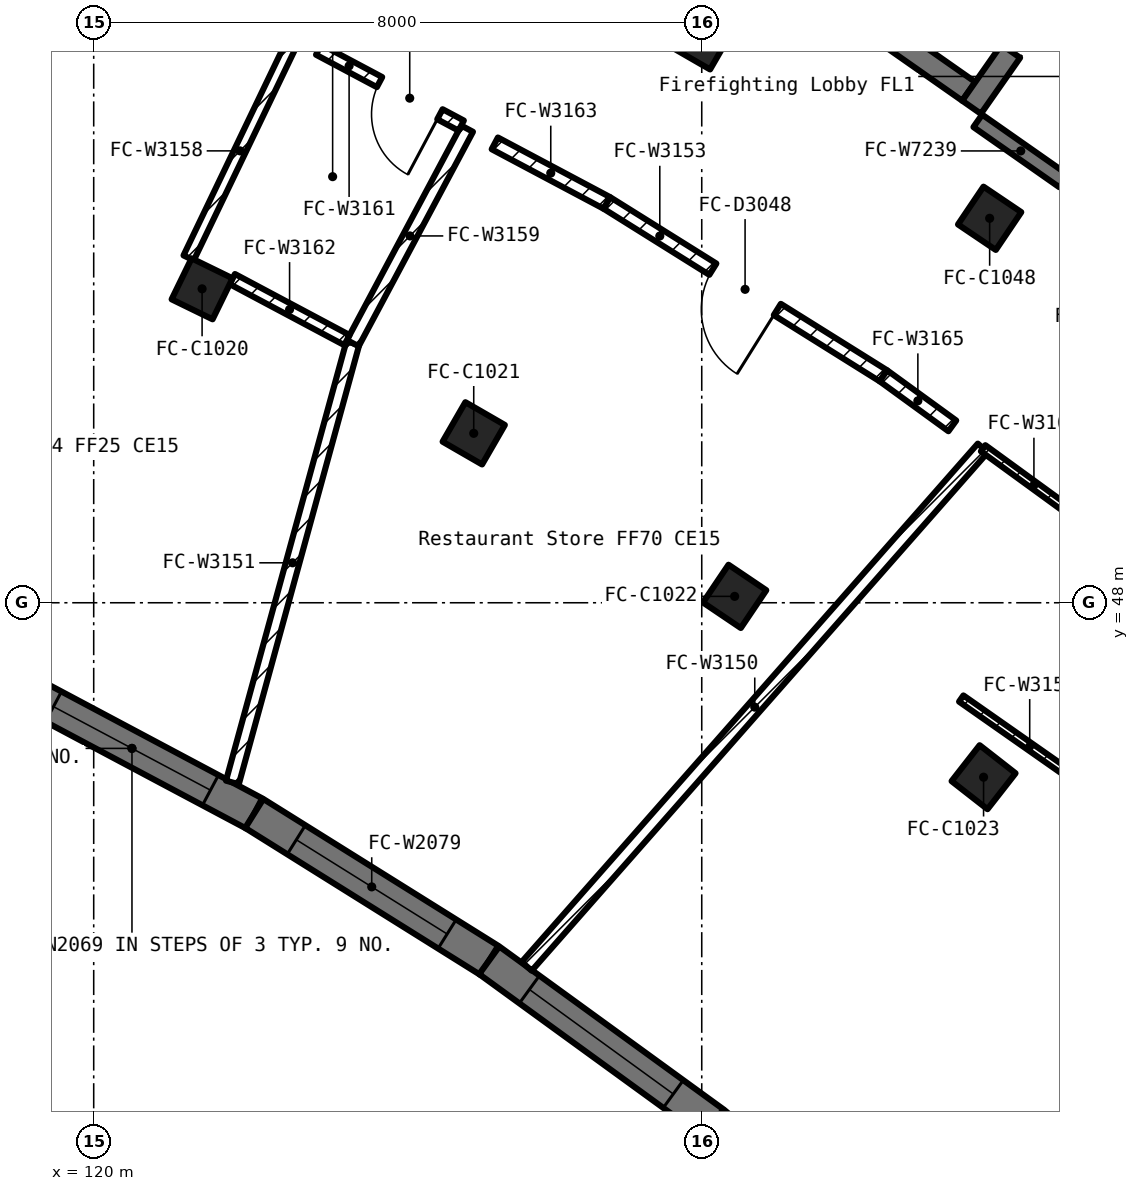
"""IFC4 building model, lengths in metres.
Left out: names, types, materials, properties, quantities, classifications, styles, units other than length and angle.
Written with IfcOpenShell. Run it as: python <this file> out.ifc"""

import sys

from ifc_helpers import new_model, si_unit, direction, frame, frame_2d, origin, origin_2d, place, context, subcontext, project, spatial, rectangle, extrude, element, fill, save


model = new_model("IFC4")
c1 = context("Model", 3, precision=1e-05, world=origin(), true_north=direction((0.0, 1.0)))
c2 = subcontext(c1, "Body", "Model", "MODEL_VIEW")
j1 = project(units=[si_unit("LENGTHUNIT", "METRE"), si_unit("PLANEANGLEUNIT", "RADIAN")], contexts=[c1])
p1 = place(None, origin())
s1 = spatial("IfcSite", under=j1, at=p1, CompositionType="ELEMENT")
p2 = place(p1, origin())
s2 = spatial("IfcBuilding", under=s1, at=p2, CompositionType="ELEMENT")
p3 = place(p2, frame((0.0, 0.0, 22.5)))
s3 = spatial("IfcBuildingStorey", under=s2, at=p3, CompositionType="ELEMENT", Elevation=22.5)
for number, where, z_axis, x_axis in (
    (1, (121.426, 52.13, 0.0), (0.0, 0.0, 1.0), (0.899, -0.438, 0.0)),
    (2, (125.0, 50.229, 0.0), (0.0, 0.0, 1.0), (0.866, -0.5, 0.0)),
    (3, (128.433, 48.084, 0.0), (0.0, 0.0, 1.0), (0.829, -0.559, 0.0)),
    (4, (131.708, 45.705, 0.0), (0.0, 0.0, 1.0), (0.788, -0.616, 0.0)),
    (5, (128.0, 55.426, 0.0), (0.0, 0.0, 1.0), (0.866, -0.5, 0.0)),
    (6, (131.788, 53.058, 0.0), (0.0, 0.0, 1.0), (0.829, -0.559, 0.0)),
):
    element("IfcColumn", number, at=place(p3, frame(where, z_axis=z_axis, x_axis=x_axis)), inside=s3, PredefinedType="COLUMN", context=c2, shape_type="SweptSolid", body=[
        extrude(rectangle(XDim=0.6, YDim=0.6, at=origin_2d()), origin(), (0.0, 0.0, 1.0), 5.5),
    ])
p4 = place(p3, frame((118.894, 46.94, 0.0), z_axis=(0.0, 0.0, 1.0), x_axis=(0.882849344925, -0.469656293651, 0.0)))
e7 = element("IfcWall", 7, at=p4, inside=s3, PredefinedType="SOLIDWALL", context=c2, shape_type="SweptSolid", body=[
    extrude(rectangle(XDim=3.645, YDim=0.45, at=frame_2d((1.823, 0.0))), origin(), (0.0, 0.0, 1.0), 5.5),
])
p5 = place(p4, frame((0.653, 0.0, 1.4)))
e8 = element("IfcOpeningElement", 8, at=p5, cuts=e7, PredefinedType="OPENING", context=c2, shape_type="SweptSolid", body=[
    extrude(rectangle(XDim=2.34, YDim=2.4, at=frame_2d((1.17, 1.2))), frame((0.0, 0.237, 0.0), z_axis=(0.0, -1.0, 0.0), x_axis=(1.0, 0.0, 0.0)), (0.0, 0.0, 1.0), 0.474),
])
p6 = place(p3, frame((122.112, 45.228, 0.0), z_axis=(0.0, 0.0, 1.0), x_axis=(0.848047203697, -0.529920692464, 0.0)))
e9 = element("IfcWall", 9, at=p6, inside=s3, PredefinedType="SOLIDWALL", context=c2, shape_type="SweptSolid", body=[
    extrude(rectangle(XDim=3.646, YDim=0.45, at=frame_2d((1.823, 0.0))), origin(), (0.0, 0.0, 1.0), 5.5),
])
p7 = place(p6, frame((0.653, 0.0, 1.4)))
e10 = element("IfcOpeningElement", 10, at=p7, cuts=e9, PredefinedType="OPENING", context=c2, shape_type="SweptSolid", body=[
    extrude(rectangle(XDim=2.34, YDim=2.4, at=frame_2d((1.17, 1.2))), frame((0.0, 0.237, 0.0), z_axis=(0.0, -1.0, 0.0), x_axis=(1.0, 0.0, 0.0)), (0.0, 0.0, 1.0), 0.474),
])
p8 = place(p3, frame((125.204, 43.296, 0.0), z_axis=(0.0, 0.0, 1.0), x_axis=(0.809109587744, -0.58765778734, 0.0)))
e11 = element("IfcWall", 11, at=p8, inside=s3, PredefinedType="SOLIDWALL", context=c2, shape_type="SweptSolid", body=[
    extrude(rectangle(XDim=3.645, YDim=0.45, at=frame_2d((1.822, 0.0))), origin(), (0.0, 0.0, 1.0), 5.5),
])
p9 = place(p8, frame((0.653, 0.0, 1.4)))
e12 = element("IfcOpeningElement", 12, at=p9, cuts=e11, PredefinedType="OPENING", context=c2, shape_type="SweptSolid", body=[
    extrude(rectangle(XDim=2.34, YDim=2.4, at=frame_2d((1.17, 1.2))), frame((0.0, 0.237, 0.0), z_axis=(0.0, -1.0, 0.0), x_axis=(1.0, 0.0, 0.0)), (0.0, 0.0, 1.0), 0.474),
])
p10 = place(p3, frame((128.153, 41.154, 0.0), z_axis=(0.0, 0.0, 1.0), x_axis=(0.766009592259, -0.642829141038, 0.0)))
e13 = element("IfcWall", 13, at=p10, inside=s3, PredefinedType="SOLIDWALL", context=c2, shape_type="SweptSolid", body=[
    extrude(rectangle(XDim=3.645, YDim=0.45, at=frame_2d((1.822, 0.0))), origin(), (0.0, 0.0, 1.0), 5.5),
])
p11 = place(p10, frame((0.653, 0.0, 1.4)))
e14 = element("IfcOpeningElement", 14, at=p11, cuts=e13, PredefinedType="OPENING", context=c2, shape_type="SweptSolid", body=[
    extrude(rectangle(XDim=2.34, YDim=2.4, at=frame_2d((1.17, 1.2))), frame((0.0, 0.237, 0.0), z_axis=(0.0, -1.0, 0.0), x_axis=(1.0, 0.0, 0.0)), (0.0, 0.0, 1.0), 0.474),
])
p12 = place(p3, frame((127.418, 57.596, 0.0), z_axis=(0.0, 0.0, 1.0), x_axis=(0.819096538389, -0.573655698829, 0.0)))
e15 = element("IfcWall", 15, at=p12, inside=s3, PredefinedType="SOLIDWALL", context=c2, shape_type="SweptSolid", body=[
    extrude(rectangle(XDim=4.999, YDim=0.3, at=frame_2d((2.5, 0.0))), origin(), (0.0, 0.0, 1.0), 5.25),
])
p13 = place(p3, frame((131.55, 54.519, 0.0), z_axis=(0.0, 0.0, 1.0), x_axis=(0.573563925118, 0.819160804606, 0.0)))
e16 = element("IfcWall", 16, at=p13, inside=s3, PredefinedType="SOLIDWALL", context=c2, shape_type="SweptSolid", body=[
    extrude(rectangle(XDim=10.0, YDim=0.3, at=frame_2d((5.0, 0.0))), origin(), (0.0, 0.0, 1.0), 5.25),
])
p14 = place(p13, frame((0.9, 0.0, 0.0)))
e17 = element("IfcOpeningElement", 17, at=p14, cuts=e16, PredefinedType="OPENING", context=c2, shape_type="SweptSolid", body=[
    extrude(rectangle(XDim=1.2, YDim=2.1, at=frame_2d((0.6, 1.05))), frame((0.0, 0.162, 0.0), z_axis=(0.0, -1.0, 0.0), x_axis=(1.0, 0.0, 0.0)), (0.0, 0.0, 1.0), 0.324),
])
p15 = place(p3, frame((131.632, 54.34, 0.0), z_axis=(0.0, 0.0, 1.0), x_axis=(0.81911891796, -0.573623742744, 0.0)))
e18 = element("IfcWall", 18, at=p15, inside=s3, PredefinedType="PARTITIONING", context=c2, shape_type="SweptSolid", body=[
    extrude(rectangle(XDim=3.959, YDim=0.2, at=frame_2d((1.979, 0.0))), origin(), (0.0, 0.0, 1.0), 5.25),
])
p16 = place(p15, frame((1.38, 0.0, 0.0)))
e19 = element("IfcOpeningElement", 19, at=p16, cuts=e18, PredefinedType="OPENING", context=c2, shape_type="SweptSolid", body=[
    extrude(rectangle(XDim=1.2, YDim=2.1, at=frame_2d((0.6, 1.05))), frame((0.0, 0.112, 0.0), z_axis=(0.0, -1.0, 0.0), x_axis=(1.0, 0.0, 0.0)), (0.0, 0.0, 1.0), 0.224),
])
p17 = place(p3, frame((125.697, 43.217, 0.0), z_axis=(0.0, 0.0, 1.0), x_axis=(0.660652130462, 0.750692188927, 0.0)))
e20 = element("IfcWall", 20, at=p17, inside=s3, PredefinedType="PARTITIONING", context=c2, shape_type="SweptSolid", body=[
    extrude(rectangle(XDim=9.083, YDim=0.175, at=frame_2d((4.542, 0.0))), origin(), (0.0, 0.0, 1.0), 4.35),
])
p18 = place(p3, frame((123.409, 51.415, 0.0), z_axis=(0.0, 0.0, 1.0), x_axis=(-0.264341053294, -0.964429265184, 0.0)))
e21 = element("IfcWall", 21, at=p18, inside=s3, PredefinedType="PARTITIONING", context=c2, shape_type="SweptSolid", body=[
    extrude(rectangle(XDim=5.992, YDim=0.175, at=frame_2d((2.996, 0.0))), origin(), (0.0, 0.0, 1.0), 4.35),
])
p19 = place(p3, frame((131.414, 46.74, 0.0), z_axis=(0.0, 0.0, 1.0), x_axis=(0.81912644488, -0.573612994359, 0.0)))
e22 = element("IfcWall", 22, at=p19, inside=s3, PredefinedType="PARTITIONING", context=c2, shape_type="SweptSolid", body=[
    extrude(rectangle(XDim=6.199, YDim=0.1, at=frame_2d((3.1, 0.0))), origin(), (0.0, 0.0, 1.0), 4.35),
])
p20 = place(p19, frame((2.2, 0.0, 0.0)))
e23 = element("IfcOpeningElement", 23, at=p20, cuts=e22, PredefinedType="OPENING", context=c2, shape_type="SweptSolid", body=[
    extrude(rectangle(XDim=1.8, YDim=2.1, at=frame_2d((0.9, 1.05))), frame((0.0, 0.062, 0.0), z_axis=(0.0, -1.0, 0.0), x_axis=(1.0, 0.0, 0.0)), (0.0, 0.0, 1.0), 0.124),
])
p21 = place(p3, frame((130.39, 50.986, 0.0), z_axis=(0.0, 0.0, 1.0), x_axis=(-0.848001499411, 0.52999382732, 0.0)))
e24 = element("IfcWall", 24, at=p21, inside=s3, PredefinedType="PARTITIONING", context=c2, shape_type="SweptSolid", body=[
    extrude(rectangle(XDim=4.292, YDim=0.175, at=frame_2d((2.146, 0.0))), origin(), (0.0, 0.0, 1.0), 4.35),
])
p22 = place(p21, frame((1.646, 0.0, 0.0)))
e25 = element("IfcOpeningElement", 25, at=p22, cuts=e24, PredefinedType="OPENING", context=c2, shape_type="SweptSolid", body=[
    extrude(rectangle(XDim=1.0, YDim=2.1, at=frame_2d((0.5, 1.05))), frame((0.0, 0.1, 0.0), z_axis=(0.0, -1.0, 0.0), x_axis=(1.0, 0.0, 0.0)), (0.0, 0.0, 1.0), 0.199),
])
p23 = place(p3, frame((122.601, 55.353, 0.0), z_axis=(0.0, 0.0, 1.0), x_axis=(-0.432837781937, -0.901471826808, 0.0)))
e26 = element("IfcWall", 26, at=p23, inside=s3, PredefinedType="PARTITIONING", context=c2, shape_type="SweptSolid", body=[
    extrude(rectangle(XDim=3.124, YDim=0.15, at=frame_2d((1.562, 0.0))), origin(), (0.0, 0.0, 1.0), 4.35),
])
p24 = place(p3, frame((124.913, 54.237, 0.0), z_axis=(0.0, 0.0, 1.0), x_axis=(-0.470362354522, -0.88247337379, 0.0)))
e27 = element("IfcWall", 27, at=p24, inside=s3, PredefinedType="PARTITIONING", context=c2, shape_type="SweptSolid", body=[
    extrude(rectangle(XDim=3.198, YDim=0.175, at=frame_2d((1.599, 0.0))), origin(), (0.0, 0.0, 1.0), 4.35),
])
p25 = place(p3, frame((124.835, 54.278, 0.0), z_axis=(0.0, 0.0, 1.0), x_axis=(-0.882782128036, 0.469782624646, 0.0)))
e28 = element("IfcWall", 28, at=p25, inside=s3, PredefinedType="PARTITIONING", context=c2, shape_type="SweptSolid", body=[
    extrude(rectangle(XDim=2.124, YDim=0.15, at=frame_2d((1.062, 0.0))), origin(), (0.0, 0.0, 1.0), 4.35),
])
p26 = place(p25, frame((0.317, 0.0, 0.0)))
e29 = element("IfcOpeningElement", 29, at=p26, cuts=e28, PredefinedType="OPENING", context=c2, shape_type="SweptSolid", body=[
    extrude(rectangle(XDim=0.9, YDim=2.1, at=frame_2d((0.45, 1.05))), frame((0.0, 0.087, 0.0), z_axis=(0.0, -1.0, 0.0), x_axis=(1.0, 0.0, 0.0)), (0.0, 0.0, 1.0), 0.174),
])
p27 = place(p3, frame((121.823, 52.259, 0.0), z_axis=(0.0, 0.0, 1.0), x_axis=(0.882673141799, -0.469987366582, 0.0)))
e30 = element("IfcWall", 30, at=p27, inside=s3, PredefinedType="PARTITIONING", context=c2, shape_type="SweptSolid", body=[
    extrude(rectangle(XDim=1.708, YDim=0.15, at=frame_2d((0.854, 0.0))), origin(), (0.0, 0.0, 1.0), 4.35),
])
p28 = place(p3, frame((126.75, 53.261, 0.0), z_axis=(0.0, 0.0, 1.0), x_axis=(-0.882996305716, 0.469379935758, 0.0)))
e31 = element("IfcWall", 31, at=p28, inside=s3, PredefinedType="PARTITIONING", context=c2, shape_type="SweptSolid", body=[
    extrude(rectangle(XDim=1.668, YDim=0.175, at=frame_2d((0.834, 0.0))), origin(), (0.0, 0.0, 1.0), 4.35),
])
p29 = place(p3, frame((131.702, 50.033, 0.0), z_axis=(0.0, 0.0, 1.0), x_axis=(0.808895718894, -0.587952137469, 0.0)))
e32 = element("IfcWall", 32, at=p29, inside=s3, PredefinedType="PARTITIONING", context=c2, shape_type="SweptSolid", body=[
    extrude(rectangle(XDim=1.653, YDim=0.1, at=frame_2d((0.827, 0.0))), origin(), (0.0, 0.0, 1.0), 4.35),
])
p30 = place(p3, frame((131.297, 50.327, 0.0), z_axis=(0.0, 0.0, 1.0), x_axis=(-0.8089996052, 0.587809185694, 0.0)))
e33 = element("IfcWall", 33, at=p30, inside=s3, PredefinedType="PARTITIONING", context=c2, shape_type="SweptSolid", body=[
    extrude(rectangle(XDim=1.121, YDim=0.175, at=frame_2d((0.561, 0.0))), origin(), (0.0, 0.0, 1.0), 4.35),
])
p31 = place(p5, origin())
e34 = element("IfcWindow", 34, at=p31, inside=s3, PartitioningType="TRIPLE_PANEL_VERTICAL", PredefinedType="WINDOW", context=c2, shape_type="SweptSolid", body=[
    extrude(rectangle(XDim=2.34, YDim=2.4, at=frame_2d((1.17, 1.2))), frame((0.0, 0.03, 0.0), z_axis=(0.0, -1.0, 0.0), x_axis=(1.0, 0.0, 0.0)), (0.0, 0.0, 1.0), 0.06),
])
fill(e8, e34)
p32 = place(p7, origin())
e35 = element("IfcWindow", 35, at=p32, inside=s3, PartitioningType="TRIPLE_PANEL_VERTICAL", PredefinedType="WINDOW", context=c2, shape_type="SweptSolid", body=[
    extrude(rectangle(XDim=2.34, YDim=2.4, at=frame_2d((1.17, 1.2))), frame((0.0, 0.03, 0.0), z_axis=(0.0, -1.0, 0.0), x_axis=(1.0, 0.0, 0.0)), (0.0, 0.0, 1.0), 0.06),
])
fill(e10, e35)
p33 = place(p9, origin())
e36 = element("IfcWindow", 36, at=p33, inside=s3, PartitioningType="TRIPLE_PANEL_VERTICAL", PredefinedType="WINDOW", context=c2, shape_type="SweptSolid", body=[
    extrude(rectangle(XDim=2.34, YDim=2.4, at=frame_2d((1.17, 1.2))), frame((0.0, 0.03, 0.0), z_axis=(0.0, -1.0, 0.0), x_axis=(1.0, 0.0, 0.0)), (0.0, 0.0, 1.0), 0.06),
])
fill(e12, e36)
p34 = place(p26, origin())
e37 = element("IfcDoor", 37, at=p34, inside=s3, OperationType="SINGLE_SWING_LEFT", PredefinedType="DOOR", context=c2, shape_type="SweptSolid", body=[
    extrude(rectangle(XDim=0.9, YDim=2.1, at=frame_2d((0.45, 1.05))), frame((0.0, 0.025, 0.0), z_axis=(0.0, -1.0, 0.0), x_axis=(1.0, 0.0, 0.0)), (0.0, 0.0, 1.0), 0.05),
])
fill(e29, e37)
p35 = place(p22, origin())
e38 = element("IfcDoor", 38, at=p35, inside=s3, OperationType="SINGLE_SWING_LEFT", PredefinedType="DOOR", context=c2, shape_type="SweptSolid", body=[
    extrude(rectangle(XDim=1.0, YDim=2.1, at=frame_2d((0.5, 1.05))), frame((0.0, 0.025, 0.0), z_axis=(0.0, -1.0, 0.0), x_axis=(1.0, 0.0, 0.0)), (0.0, 0.0, 1.0), 0.05),
])
fill(e25, e38)
save(model, sys.argv[1])
